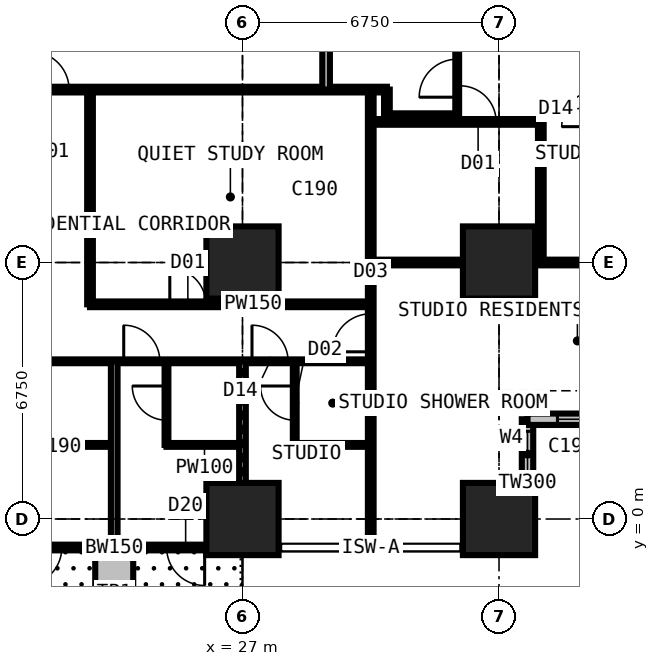
"""IFC4 building model, lengths in metres.
Left out: names, types, materials, properties, quantities, classifications, styles, units other than length and angle.
Written with IfcOpenShell. Run it as: python <this file> out.ifc"""

import sys

from ifc_helpers import new_model, si_unit, direction, frame, frame_2d, origin, origin_2d, place, context, subcontext, project, spatial, rectangle, extrude, element, fill, save


model = new_model("IFC4")
c1 = context("Model", 3, precision=1e-05, world=origin(), true_north=direction((0.0, 1.0)))
c2 = subcontext(c1, "Body", "Model", "MODEL_VIEW")
j1 = project(units=[si_unit("LENGTHUNIT", "METRE"), si_unit("PLANEANGLEUNIT", "RADIAN")], contexts=[c1])
p1 = place(None, origin())
s1 = spatial("IfcSite", under=j1, at=p1, CompositionType="ELEMENT")
p2 = place(p1, origin())
s2 = spatial("IfcBuilding", under=s1, at=p2, CompositionType="ELEMENT")
p3 = place(p2, frame((0.0, 0.0, 36.0)))
s3 = spatial("IfcBuildingStorey", under=s2, at=p3, CompositionType="ELEMENT", Elevation=36.0)
for number, where, z_axis, x_axis in (
    (1, (27.0, 0.0, 0.0), (0.0, 0.0, 1.0), (1.0, 0.0, 0.0)),
    (2, (27.0, 6.75, 0.0), (0.0, 0.0, 1.0), (1.0, 0.0, 0.0)),
    (3, (33.75, 0.0, 0.0), (0.0, 0.0, 1.0), (1.0, 0.0, 0.0)),
    (4, (33.75, 6.75, 0.0), (0.0, 0.0, 1.0), (1.0, 0.0, 0.0)),
):
    element("IfcColumn", number, at=place(p3, frame(where, z_axis=z_axis, x_axis=x_axis)), inside=s3, PredefinedType="COLUMN", context=c2, shape_type="SweptSolid", body=[
        extrude(rectangle(XDim=1.9, YDim=1.9, at=origin_2d()), origin(), (0.0, 0.0, 1.0), 3.6),
    ])
p4 = place(p3, frame((27.0, -0.75, 0.0), z_axis=(0.0, 0.0, 1.0), x_axis=(-1.0, 0.0, 0.0)))
e5 = element("IfcWall", 5, at=p4, inside=s3, PredefinedType="SOLIDWALL", context=c2, shape_type="SweptSolid", body=[
    extrude(rectangle(XDim=6.75, YDim=0.15, at=frame_2d((3.375, 0.0))), origin(), (0.0, 0.0, 1.0), 3.375),
])
p5 = place(p4, frame((0.996, 0.0, 0.0)))
e6 = element("IfcOpeningElement", 6, at=p5, cuts=e5, PredefinedType="OPENING", context=c2, shape_type="SweptSolid", body=[
    extrude(rectangle(XDim=1.0, YDim=2.2, at=frame_2d((0.5, 1.1))), frame((0.0, 0.085, 0.0), z_axis=(0.0, -1.0, 0.0), x_axis=(1.0, 0.0, 0.0)), (0.0, 0.0, 1.0), 0.17),
])
p6 = place(p4, frame((2.042, 0.0, 0.9)))
e7 = element("IfcOpeningElement", 7, at=p6, cuts=e5, PredefinedType="OPENING", context=c2, shape_type="SweptSolid", body=[
    extrude(rectangle(XDim=1.2, YDim=1.8, at=frame_2d((0.6, 0.9))), frame((0.0, 0.085, 0.0), z_axis=(0.0, -1.0, 0.0), x_axis=(1.0, 0.0, 0.0)), (0.0, 0.0, 1.0), 0.17),
])
p7 = place(p4, frame((4.754, 0.0, 0.0)))
e8 = element("IfcOpeningElement", 8, at=p7, cuts=e5, PredefinedType="OPENING", context=c2, shape_type="SweptSolid", body=[
    extrude(rectangle(XDim=1.0, YDim=2.2, at=frame_2d((0.5, 1.1))), frame((0.0, 0.085, 0.0), z_axis=(0.0, -1.0, 0.0), x_axis=(1.0, 0.0, 0.0)), (0.0, 0.0, 1.0), 0.17),
])
p8 = place(p4, frame((3.508, 0.0, 0.9)))
e9 = element("IfcOpeningElement", 9, at=p8, cuts=e5, PredefinedType="OPENING", context=c2, shape_type="SweptSolid", body=[
    extrude(rectangle(XDim=1.2, YDim=1.8, at=frame_2d((0.6, 0.9))), frame((0.0, 0.085, 0.0), z_axis=(0.0, -1.0, 0.0), x_axis=(1.0, 0.0, 0.0)), (0.0, 0.0, 1.0), 0.17),
])
p9 = place(p3, frame((34.5, -0.75, 0.0), z_axis=(0.0, 0.0, 1.0), x_axis=(0.0, 1.0, 0.0)))
e10 = element("IfcWall", 10, at=p9, inside=s3, PredefinedType="SOLIDWALL", context=c2, shape_type="SweptSolid", body=[
    extrude(rectangle(XDim=3.375, YDim=0.3, at=frame_2d((1.688, 0.0))), origin(), (0.0, 0.0, 1.0), 3.375),
])
p10 = place(p9, frame((1.857, 0.0, 0.9)))
e11 = element("IfcOpeningElement", 11, at=p10, cuts=e10, PredefinedType="OPENING", context=c2, shape_type="SweptSolid", body=[
    extrude(rectangle(XDim=1.2, YDim=1.8, at=frame_2d((0.6, 0.9))), frame((0.0, 0.16, 0.0), z_axis=(0.0, -1.0, 0.0), x_axis=(1.0, 0.0, 0.0)), (0.0, 0.0, 1.0), 0.32),
])
p11 = place(p3, frame((34.5, 2.625, 0.0), z_axis=(0.0, 0.0, 1.0), x_axis=(1.0, 0.0, 0.0)))
e12 = element("IfcWall", 12, at=p11, inside=s3, PredefinedType="SOLIDWALL", context=c2, shape_type="SweptSolid", body=[
    extrude(rectangle(XDim=3.375, YDim=0.3, at=frame_2d((1.688, 0.0))), origin(), (0.0, 0.0, 1.0), 3.375),
])
p12 = place(p11, frame((0.788, 0.0, 0.6)))
e13 = element("IfcOpeningElement", 13, at=p12, cuts=e12, PredefinedType="OPENING", context=c2, shape_type="SweptSolid", body=[
    extrude(rectangle(XDim=1.8, YDim=2.1, at=frame_2d((0.9, 1.05))), frame((0.0, 0.16, 0.0), z_axis=(0.0, -1.0, 0.0), x_axis=(1.0, 0.0, 0.0)), (0.0, 0.0, 1.0), 0.32),
])
p13 = place(p3, frame((23.625, -0.85, 0.0), z_axis=(0.0, 0.0, 1.0), x_axis=(0.0, -1.0, 0.0)))
e14 = element("IfcWall", 14, at=p13, inside=s3, PredefinedType="USERDEFINED", context=c2, shape_type="SweptSolid", body=[
    extrude(rectangle(XDim=2.2, YDim=1.0, at=frame_2d((1.1, 0.0))), origin(), (0.0, 0.0, 1.0), 0.9),
])
p14 = place(p3, frame((6.75, 4.15, 0.0), z_axis=(0.0, 0.0, 1.0), x_axis=(1.0, 0.0, 0.0)))
e15 = element("IfcWall", 15, at=p14, inside=s3, PredefinedType="PARTITIONING", context=c2, shape_type="SweptSolid", body=[
    extrude(rectangle(XDim=23.625, YDim=0.1, at=frame_2d((11.812, 0.0))), origin(), (0.0, 0.0, 1.0), 3.375),
])
p15 = place(p14, frame((0.2, 0.0, 0.0)))
e16 = element("IfcOpeningElement", 16, at=p15, cuts=e15, PredefinedType="OPENING", context=c2, shape_type="SweptSolid", body=[
    extrude(rectangle(XDim=0.95, YDim=2.2, at=frame_2d((0.475, 1.1))), frame((0.0, 0.06, 0.0), z_axis=(0.0, -1.0, 0.0), x_axis=(1.0, 0.0, 0.0)), (0.0, 0.0, 1.0), 0.12),
])
p16 = place(p14, frame((3.625, 0.0, 0.0)))
e17 = element("IfcOpeningElement", 17, at=p16, cuts=e15, PredefinedType="OPENING", context=c2, shape_type="SweptSolid", body=[
    extrude(rectangle(XDim=0.95, YDim=2.2, at=frame_2d((0.475, 1.1))), frame((0.0, 0.06, 0.0), z_axis=(0.0, -1.0, 0.0), x_axis=(1.0, 0.0, 0.0)), (0.0, 0.0, 1.0), 0.12),
])
p17 = place(p14, frame((7.0, 0.0, 0.0)))
e18 = element("IfcOpeningElement", 18, at=p17, cuts=e15, PredefinedType="OPENING", context=c2, shape_type="SweptSolid", body=[
    extrude(rectangle(XDim=0.95, YDim=2.2, at=frame_2d((0.475, 1.1))), frame((0.0, 0.06, 0.0), z_axis=(0.0, -1.0, 0.0), x_axis=(1.0, 0.0, 0.0)), (0.0, 0.0, 1.0), 0.12),
])
p18 = place(p14, frame((10.325, 0.0, 0.0)))
e19 = element("IfcOpeningElement", 19, at=p18, cuts=e15, PredefinedType="OPENING", context=c2, shape_type="SweptSolid", body=[
    extrude(rectangle(XDim=0.95, YDim=2.2, at=frame_2d((0.475, 1.1))), frame((0.0, 0.06, 0.0), z_axis=(0.0, -1.0, 0.0), x_axis=(1.0, 0.0, 0.0)), (0.0, 0.0, 1.0), 0.12),
])
p19 = place(p14, frame((13.75, 0.0, 0.0)))
e20 = element("IfcOpeningElement", 20, at=p19, cuts=e15, PredefinedType="OPENING", context=c2, shape_type="SweptSolid", body=[
    extrude(rectangle(XDim=0.95, YDim=2.2, at=frame_2d((0.475, 1.1))), frame((0.0, 0.06, 0.0), z_axis=(0.0, -1.0, 0.0), x_axis=(1.0, 0.0, 0.0)), (0.0, 0.0, 1.0), 0.12),
])
p20 = place(p14, frame((17.125, 0.0, 0.0)))
e21 = element("IfcOpeningElement", 21, at=p20, cuts=e15, PredefinedType="OPENING", context=c2, shape_type="SweptSolid", body=[
    extrude(rectangle(XDim=0.95, YDim=2.2, at=frame_2d((0.475, 1.1))), frame((0.0, 0.06, 0.0), z_axis=(0.0, -1.0, 0.0), x_axis=(1.0, 0.0, 0.0)), (0.0, 0.0, 1.0), 0.12),
])
p21 = place(p14, frame((20.5, 0.0, 0.0)))
e22 = element("IfcOpeningElement", 22, at=p21, cuts=e15, PredefinedType="OPENING", context=c2, shape_type="SweptSolid", body=[
    extrude(rectangle(XDim=0.95, YDim=2.2, at=frame_2d((0.475, 1.1))), frame((0.0, 0.06, 0.0), z_axis=(0.0, -1.0, 0.0), x_axis=(1.0, 0.0, 0.0)), (0.0, 0.0, 1.0), 0.12),
])
p22 = place(p3, frame((10.125, 11.3, 0.0), z_axis=(0.0, 0.0, 1.0), x_axis=(1.0, 0.0, 0.0)))
e23 = element("IfcWall", 23, at=p22, inside=s3, PredefinedType="PARTITIONING", context=c2, shape_type="SweptSolid", body=[
    extrude(rectangle(XDim=20.675, YDim=0.15, at=frame_2d((10.337, 0.0))), origin(), (0.0, 0.0, 1.0), 3.375),
])
p23 = place(p22, frame((5.2, 0.0, 0.0)))
e24 = element("IfcOpeningElement", 24, at=p23, cuts=e23, PredefinedType="OPENING", context=c2, shape_type="SweptSolid", body=[
    extrude(rectangle(XDim=1.0, YDim=2.2, at=frame_2d((0.5, 1.1))), frame((0.0, 0.085, 0.0), z_axis=(0.0, -1.0, 0.0), x_axis=(1.0, 0.0, 0.0)), (0.0, 0.0, 1.0), 0.17),
])
p24 = place(p22, frame((11.312, 0.0, 0.0)))
e25 = element("IfcOpeningElement", 25, at=p24, cuts=e23, PredefinedType="OPENING", context=c2, shape_type="SweptSolid", body=[
    extrude(rectangle(XDim=1.0, YDim=2.2, at=frame_2d((0.5, 1.1))), frame((0.0, 0.085, 0.0), z_axis=(0.0, -1.0, 0.0), x_axis=(1.0, 0.0, 0.0)), (0.0, 0.0, 1.0), 0.17),
])
p25 = place(p22, frame((2.425, 0.0, 0.0)))
e26 = element("IfcOpeningElement", 26, at=p25, cuts=e23, PredefinedType="OPENING", context=c2, shape_type="SweptSolid", body=[
    extrude(rectangle(XDim=0.95, YDim=2.2, at=frame_2d((0.475, 1.1))), frame((0.0, 0.085, 0.0), z_axis=(0.0, -1.0, 0.0), x_axis=(1.0, 0.0, 0.0)), (0.0, 0.0, 1.0), 0.17),
])
p26 = place(p3, frame((21.625, 1.95, 0.0), z_axis=(0.0, 0.0, 1.0), x_axis=(1.0, 0.0, 0.0)))
e27 = element("IfcWall", 27, at=p26, inside=s3, PredefinedType="PARTITIONING", context=c2, shape_type="SweptSolid", body=[
    extrude(rectangle(XDim=2.0, YDim=0.1, at=frame_2d((1.0, 0.0))), origin(), (0.0, 0.0, 1.0), 3.375),
])
p27 = place(p3, frame((22.988, 5.65, 0.0), z_axis=(0.0, 0.0, 1.0), x_axis=(1.0, 0.0, 0.0)))
e28 = element("IfcWall", 28, at=p27, inside=s3, PredefinedType="PARTITIONING", context=c2, shape_type="SweptSolid", body=[
    extrude(rectangle(XDim=7.387, YDim=0.15, at=frame_2d((3.694, 0.0))), origin(), (0.0, 0.0, 1.0), 3.375),
])
p28 = place(p27, frame((2.1, 0.0, 0.0)))
e29 = element("IfcOpeningElement", 29, at=p28, cuts=e28, PredefinedType="OPENING", context=c2, shape_type="SweptSolid", body=[
    extrude(rectangle(XDim=0.95, YDim=2.2, at=frame_2d((0.475, 1.1))), frame((0.0, 0.085, 0.0), z_axis=(0.0, -1.0, 0.0), x_axis=(1.0, 0.0, 0.0)), (0.0, 0.0, 1.0), 0.17),
])
p29 = place(p3, frame((22.988, 5.65, 0.0), z_axis=(0.0, 0.0, 1.0), x_axis=(0.0, 1.0, 0.0)))
e30 = element("IfcWall", 30, at=p29, inside=s3, PredefinedType="PARTITIONING", context=c2, shape_type="SweptSolid", body=[
    extrude(rectangle(XDim=5.65, YDim=0.15, at=frame_2d((2.825, 0.0))), origin(), (0.0, 0.0, 1.0), 3.375),
])
p30 = place(p3, frame((23.625, -0.734, 0.0), z_axis=(0.0, 0.0, 1.0), x_axis=(0.0, 1.0, 0.0)))
e31 = element("IfcWall", 31, at=p30, inside=s3, PredefinedType="PARTITIONING", context=c2, shape_type="SweptSolid", body=[
    extrude(rectangle(XDim=4.884, YDim=0.175, at=frame_2d((2.442, 0.0))), origin(), (0.0, 0.0, 1.0), 3.375),
])
p31 = place(p3, frame((25.0, 1.95, 0.0), z_axis=(0.0, 0.0, 1.0), x_axis=(0.0, 1.0, 0.0)))
e32 = element("IfcWall", 32, at=p31, inside=s3, PredefinedType="PARTITIONING", context=c2, shape_type="SweptSolid", body=[
    extrude(rectangle(XDim=2.2, YDim=0.1, at=frame_2d((1.1, 0.0))), origin(), (0.0, 0.0, 1.0), 3.375),
])
p32 = place(p31, frame((0.65, 0.0, 0.0)))
e33 = element("IfcOpeningElement", 33, at=p32, cuts=e32, PredefinedType="OPENING", context=c2, shape_type="SweptSolid", body=[
    extrude(rectangle(XDim=0.9, YDim=2.2, at=frame_2d((0.45, 1.1))), frame((0.0, 0.06, 0.0), z_axis=(0.0, -1.0, 0.0), x_axis=(1.0, 0.0, 0.0)), (0.0, 0.0, 1.0), 0.12),
])
p33 = place(p3, frame((25.0, 1.95, 0.0), z_axis=(0.0, 0.0, 1.0), x_axis=(1.0, 0.0, 0.0)))
e34 = element("IfcWall", 34, at=p33, inside=s3, PredefinedType="PARTITIONING", context=c2, shape_type="SweptSolid", body=[
    extrude(rectangle(XDim=2.0, YDim=0.1, at=frame_2d((1.0, 0.0))), origin(), (0.0, 0.0, 1.0), 3.375),
])
p34 = place(p3, frame((27.0, -0.734, 0.0), z_axis=(0.0, 0.0, 1.0), x_axis=(0.0, 1.0, 0.0)))
e35 = element("IfcWall", 35, at=p34, inside=s3, PredefinedType="PARTITIONING", context=c2, shape_type="SweptSolid", body=[
    extrude(rectangle(XDim=4.884, YDim=0.175, at=frame_2d((2.442, 0.0))), origin(), (0.0, 0.0, 1.0), 2.877),
])
p35 = place(p3, frame((28.375, 1.95, 0.0), z_axis=(0.0, 0.0, 1.0), x_axis=(0.0, 1.0, 0.0)))
e36 = element("IfcWall", 36, at=p35, inside=s3, PredefinedType="PARTITIONING", context=c2, shape_type="SweptSolid", body=[
    extrude(rectangle(XDim=2.2, YDim=0.1, at=frame_2d((1.1, 0.0))), origin(), (0.0, 0.0, 1.0), 3.375),
])
p36 = place(p35, frame((0.65, 0.0, 0.0)))
e37 = element("IfcOpeningElement", 37, at=p36, cuts=e36, PredefinedType="OPENING", context=c2, shape_type="SweptSolid", body=[
    extrude(rectangle(XDim=0.9, YDim=2.2, at=frame_2d((0.45, 1.1))), frame((0.0, 0.06, 0.0), z_axis=(0.0, -1.0, 0.0), x_axis=(1.0, 0.0, 0.0)), (0.0, 0.0, 1.0), 0.12),
])
p37 = place(p3, frame((28.375, 1.95, 0.0), z_axis=(0.0, 0.0, 1.0), x_axis=(1.0, 0.0, 0.0)))
e38 = element("IfcWall", 38, at=p37, inside=s3, PredefinedType="PARTITIONING", context=c2, shape_type="SweptSolid", body=[
    extrude(rectangle(XDim=2.0, YDim=0.1, at=frame_2d((1.0, 0.0))), origin(), (0.0, 0.0, 1.0), 3.375),
])
p38 = place(p3, frame((29.2, 11.3, 0.0), z_axis=(0.0, 0.0, 1.0), x_axis=(0.0, 1.0, 0.0)))
e39 = element("IfcWall", 39, at=p38, inside=s3, PredefinedType="PARTITIONING", context=c2, shape_type="SweptSolid", body=[
    extrude(rectangle(XDim=17.9, YDim=0.2, at=frame_2d((8.95, 0.0))), origin(), (0.0, 0.0, 1.0), 3.375),
])
p39 = place(p38, frame((8.35, 0.0, 0.0)))
e40 = element("IfcOpeningElement", 40, at=p39, cuts=e39, PredefinedType="OPENING", context=c2, shape_type="SweptSolid", body=[
    extrude(rectangle(XDim=1.2, YDim=2.2, at=frame_2d((0.6, 1.1))), frame((0.0, 0.11, 0.0), z_axis=(0.0, -1.0, 0.0), x_axis=(1.0, 0.0, 0.0)), (0.0, 0.0, 1.0), 0.22),
])
p40 = place(p3, frame((30.375, -0.734, 0.0), z_axis=(0.0, 0.0, 1.0), x_axis=(0.0, 1.0, 0.0)))
e41 = element("IfcWall", 41, at=p40, inside=s3, PredefinedType="PARTITIONING", context=c2, shape_type="SweptSolid", body=[
    extrude(rectangle(XDim=12.034, YDim=0.15, at=frame_2d((6.017, 0.0))), origin(), (0.0, 0.0, 1.0), 3.375),
])
p41 = place(p40, frame((5.134, 0.0, 0.0)))
e42 = element("IfcOpeningElement", 42, at=p41, cuts=e41, PredefinedType="OPENING", context=c2, shape_type="SweptSolid", body=[
    extrude(rectangle(XDim=1.0, YDim=2.2, at=frame_2d((0.5, 1.1))), frame((0.0, 0.085, 0.0), z_axis=(0.0, -1.0, 0.0), x_axis=(1.0, 0.0, 0.0)), (0.0, 0.0, 1.0), 0.17),
])
p42 = place(p3, frame((30.375, 6.75, 0.0), z_axis=(0.0, 0.0, 1.0), x_axis=(1.0, 0.0, 0.0)))
e43 = element("IfcWall", 43, at=p42, inside=s3, PredefinedType="PARTITIONING", context=c2, shape_type="SweptSolid", body=[
    extrude(rectangle(XDim=5.975, YDim=0.15, at=frame_2d((2.988, 0.0))), origin(), (0.0, 0.0, 1.0), 2.877),
])
p43 = place(p3, frame((30.375, 10.45, 0.0), z_axis=(0.0, 0.0, 1.0), x_axis=(1.0, 0.0, 0.0)))
e44 = element("IfcWall", 44, at=p43, inside=s3, PredefinedType="PARTITIONING", context=c2, shape_type="SweptSolid", body=[
    extrude(rectangle(XDim=4.475, YDim=0.15, at=frame_2d((2.238, 0.0))), origin(), (0.0, 0.0, 1.0), 3.375),
])
p44 = place(p43, frame((2.35, 0.0, 0.0)))
e45 = element("IfcOpeningElement", 45, at=p44, cuts=e44, PredefinedType="OPENING", context=c2, shape_type="SweptSolid", body=[
    extrude(rectangle(XDim=0.95, YDim=2.2, at=frame_2d((0.475, 1.1))), frame((0.0, 0.085, 0.0), z_axis=(0.0, -1.0, 0.0), x_axis=(1.0, 0.0, 0.0)), (0.0, 0.0, 1.0), 0.17),
])
p45 = place(p3, frame((30.8, 10.6, 0.0), z_axis=(0.0, 0.0, 1.0), x_axis=(0.0, 1.0, 0.0)))
e46 = element("IfcWall", 46, at=p45, inside=s3, PredefinedType="PARTITIONING", context=c2, shape_type="SweptSolid", body=[
    extrude(rectangle(XDim=0.7, YDim=0.15, at=frame_2d((0.35, 0.0))), origin(), (0.0, 0.0, 1.0), 3.375),
])
p46 = place(p3, frame((30.8, 10.6, 0.0), z_axis=(0.0, 0.0, 1.0), x_axis=(1.0, 0.0, 0.0)))
e47 = element("IfcWall", 47, at=p46, inside=s3, PredefinedType="PARTITIONING", context=c2, shape_type="SweptSolid", body=[
    extrude(rectangle(XDim=1.85, YDim=0.15, at=frame_2d((0.925, 0.0))), origin(), (0.0, 0.0, 1.0), 3.375),
])
p47 = place(p3, frame((32.65, 10.6, 0.0), z_axis=(0.0, 0.0, 1.0), x_axis=(0.0, 1.0, 0.0)))
e48 = element("IfcWall", 48, at=p47, inside=s3, PredefinedType="SHEAR", context=c2, shape_type="SweptSolid", body=[
    extrude(rectangle(XDim=9.3, YDim=0.1, at=frame_2d((4.65, 0.0))), origin(), (0.0, 0.0, 1.0), 3.375),
])
p48 = place(p47, frame((0.5, 0.0, 0.0)))
e49 = element("IfcOpeningElement", 49, at=p48, cuts=e48, PredefinedType="OPENING", context=c2, shape_type="SweptSolid", body=[
    extrude(rectangle(XDim=1.0, YDim=2.2, at=frame_2d((0.5, 1.1))), frame((0.0, 0.06, 0.0), z_axis=(0.0, -1.0, 0.0), x_axis=(1.0, 0.0, 0.0)), (0.0, 0.0, 1.0), 0.12),
])
p49 = place(p3, frame((34.85, 6.75, 0.0), z_axis=(0.0, 0.0, 1.0), x_axis=(0.0, 1.0, 0.0)))
e50 = element("IfcWall", 50, at=p49, inside=s3, PredefinedType="PARTITIONING", context=c2, shape_type="SweptSolid", body=[
    extrude(rectangle(XDim=3.7, YDim=0.15, at=frame_2d((1.85, 0.0))), origin(), (0.0, 0.0, 1.0), 3.375),
])
p50 = place(p5, origin())
e51 = element("IfcDoor", 51, at=p50, inside=s3, OperationType="SINGLE_SWING_LEFT", PredefinedType="DOOR", context=c2, shape_type="SweptSolid", body=[
    extrude(rectangle(XDim=1.0, YDim=2.2, at=frame_2d((0.5, 1.1))), frame((0.0, 0.025, 0.0), z_axis=(0.0, -1.0, 0.0), x_axis=(1.0, 0.0, 0.0)), (0.0, 0.0, 1.0), 0.05),
])
fill(e6, e51)
p51 = place(p6, origin())
e52 = element("IfcWindow", 52, at=p51, inside=s3, PartitioningType="SINGLE_PANEL", PredefinedType="WINDOW", context=c2, shape_type="SweptSolid", body=[
    extrude(rectangle(XDim=1.2, YDim=1.8, at=frame_2d((0.6, 0.9))), frame((0.0, 0.03, 0.0), z_axis=(0.0, -1.0, 0.0), x_axis=(1.0, 0.0, 0.0)), (0.0, 0.0, 1.0), 0.06),
])
fill(e7, e52)
p52 = place(p7, origin())
e53 = element("IfcDoor", 53, at=p52, inside=s3, OperationType="SINGLE_SWING_RIGHT", PredefinedType="DOOR", context=c2, shape_type="SweptSolid", body=[
    extrude(rectangle(XDim=1.0, YDim=2.2, at=frame_2d((0.5, 1.1))), frame((0.0, 0.025, 0.0), z_axis=(0.0, -1.0, 0.0), x_axis=(1.0, 0.0, 0.0)), (0.0, 0.0, 1.0), 0.05),
])
fill(e8, e53)
p53 = place(p8, origin())
e54 = element("IfcWindow", 54, at=p53, inside=s3, PartitioningType="SINGLE_PANEL", PredefinedType="WINDOW", context=c2, shape_type="SweptSolid", body=[
    extrude(rectangle(XDim=1.2, YDim=1.8, at=frame_2d((0.6, 0.9))), frame((0.0, 0.03, 0.0), z_axis=(0.0, -1.0, 0.0), x_axis=(1.0, 0.0, 0.0)), (0.0, 0.0, 1.0), 0.06),
])
fill(e9, e54)
p54 = place(p10, origin())
e55 = element("IfcWindow", 55, at=p54, inside=s3, PartitioningType="SINGLE_PANEL", PredefinedType="WINDOW", context=c2, shape_type="SweptSolid", body=[
    extrude(rectangle(XDim=1.2, YDim=1.8, at=frame_2d((0.6, 0.9))), frame((0.0, 0.03, 0.0), z_axis=(0.0, -1.0, 0.0), x_axis=(1.0, 0.0, 0.0)), (0.0, 0.0, 1.0), 0.06),
])
fill(e11, e55)
p55 = place(p12, origin())
e56 = element("IfcWindow", 56, at=p55, inside=s3, PartitioningType="SINGLE_PANEL", PredefinedType="WINDOW", context=c2, shape_type="SweptSolid", body=[
    extrude(rectangle(XDim=1.8, YDim=2.1, at=frame_2d((0.9, 1.05))), frame((0.0, 0.03, 0.0), z_axis=(0.0, -1.0, 0.0), x_axis=(1.0, 0.0, 0.0)), (0.0, 0.0, 1.0), 0.06),
])
fill(e13, e56)
p56 = place(p20, origin())
e57 = element("IfcDoor", 57, at=p56, inside=s3, OperationType="SINGLE_SWING_LEFT", PredefinedType="DOOR", context=c2, shape_type="SweptSolid", body=[
    extrude(rectangle(XDim=0.95, YDim=2.2, at=frame_2d((0.475, 1.1))), frame((0.0, 0.025, 0.0), z_axis=(0.0, -1.0, 0.0), x_axis=(1.0, 0.0, 0.0)), (0.0, 0.0, 1.0), 0.05),
])
fill(e21, e57)
p57 = place(p32, origin())
e58 = element("IfcDoor", 58, at=p57, inside=s3, OperationType="SINGLE_SWING_RIGHT", PredefinedType="DOOR", context=c2, shape_type="SweptSolid", body=[
    extrude(rectangle(XDim=0.9, YDim=2.2, at=frame_2d((0.45, 1.1))), frame((0.0, 0.025, 0.0), z_axis=(0.0, -1.0, 0.0), x_axis=(1.0, 0.0, 0.0)), (0.0, 0.0, 1.0), 0.05),
])
fill(e33, e58)
p58 = place(p21, origin())
e59 = element("IfcDoor", 59, at=p58, inside=s3, OperationType="SINGLE_SWING_LEFT", PredefinedType="DOOR", context=c2, shape_type="SweptSolid", body=[
    extrude(rectangle(XDim=0.95, YDim=2.2, at=frame_2d((0.475, 1.1))), frame((0.0, 0.025, 0.0), z_axis=(0.0, -1.0, 0.0), x_axis=(1.0, 0.0, 0.0)), (0.0, 0.0, 1.0), 0.05),
])
fill(e22, e59)
p59 = place(p36, origin())
e60 = element("IfcDoor", 60, at=p59, inside=s3, OperationType="SINGLE_SWING_RIGHT", PredefinedType="DOOR", context=c2, shape_type="SweptSolid", body=[
    extrude(rectangle(XDim=0.9, YDim=2.2, at=frame_2d((0.45, 1.1))), frame((0.0, 0.025, 0.0), z_axis=(0.0, -1.0, 0.0), x_axis=(1.0, 0.0, 0.0)), (0.0, 0.0, 1.0), 0.05),
])
fill(e37, e60)
p60 = place(p24, origin())
e61 = element("IfcDoor", 61, at=p60, inside=s3, OperationType="SINGLE_SWING_LEFT", PredefinedType="DOOR", context=c2, shape_type="SweptSolid", body=[
    extrude(rectangle(XDim=1.0, YDim=2.2, at=frame_2d((0.5, 1.1))), frame((0.0, 0.025, 0.0), z_axis=(0.0, -1.0, 0.0), x_axis=(1.0, 0.0, 0.0)), (0.0, 0.0, 1.0), 0.05),
])
fill(e25, e61)
p61 = place(p28, origin())
e62 = element("IfcDoor", 62, at=p61, inside=s3, OperationType="SINGLE_SWING_LEFT", PredefinedType="DOOR", context=c2, shape_type="SweptSolid", body=[
    extrude(rectangle(XDim=0.95, YDim=2.2, at=frame_2d((0.475, 1.1))), frame((0.0, 0.025, 0.0), z_axis=(0.0, -1.0, 0.0), x_axis=(1.0, 0.0, 0.0)), (0.0, 0.0, 1.0), 0.05),
])
fill(e29, e62)
p62 = place(p41, origin())
e63 = element("IfcDoor", 63, at=p62, inside=s3, OperationType="SINGLE_SWING_LEFT", PredefinedType="DOOR", context=c2, shape_type="SweptSolid", body=[
    extrude(rectangle(XDim=1.0, YDim=2.2, at=frame_2d((0.5, 1.1))), frame((0.0, 0.025, 0.0), z_axis=(0.0, -1.0, 0.0), x_axis=(1.0, 0.0, 0.0)), (0.0, 0.0, 1.0), 0.05),
])
fill(e42, e63)
p63 = place(p48, origin())
e64 = element("IfcDoor", 64, at=p63, inside=s3, OperationType="SINGLE_SWING_LEFT", PredefinedType="DOOR", context=c2, shape_type="SweptSolid", body=[
    extrude(rectangle(XDim=1.0, YDim=2.2, at=frame_2d((0.5, 1.1))), frame((0.0, 0.025, 0.0), z_axis=(0.0, -1.0, 0.0), x_axis=(1.0, 0.0, 0.0)), (0.0, 0.0, 1.0), 0.05),
])
fill(e49, e64)
p64 = place(p44, origin())
e65 = element("IfcDoor", 65, at=p64, inside=s3, OperationType="SINGLE_SWING_LEFT", PredefinedType="DOOR", context=c2, shape_type="SweptSolid", body=[
    extrude(rectangle(XDim=0.95, YDim=2.2, at=frame_2d((0.475, 1.1))), frame((0.0, 0.025, 0.0), z_axis=(0.0, -1.0, 0.0), x_axis=(1.0, 0.0, 0.0)), (0.0, 0.0, 1.0), 0.05),
])
fill(e45, e65)
save(model, sys.argv[1])
